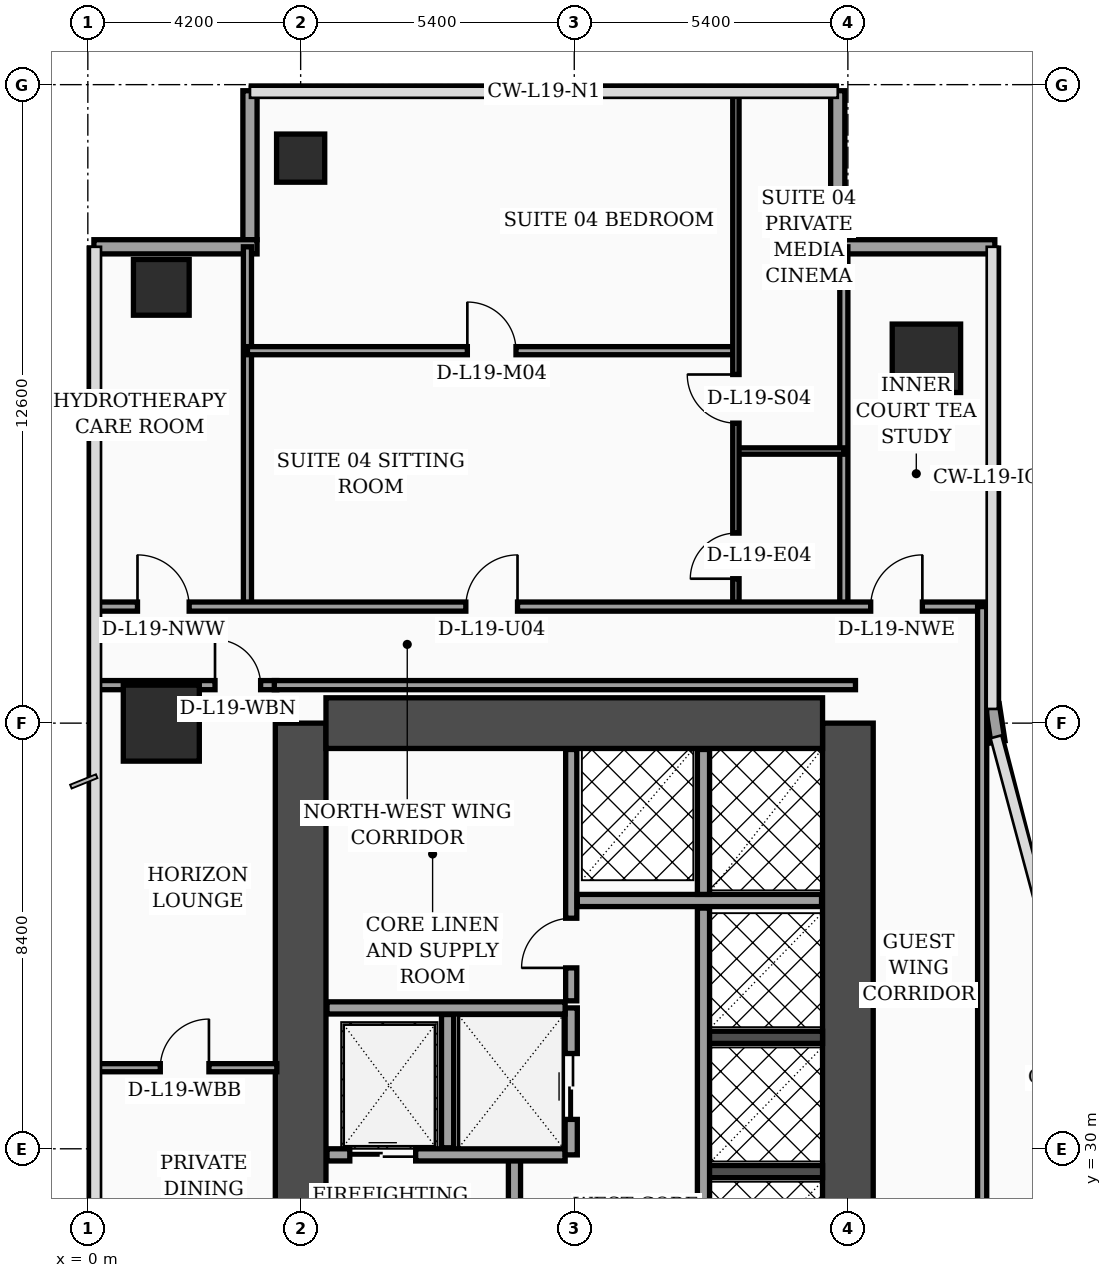
"""IFC4 building model, lengths in metres.
Left out: names, types, materials, properties, quantities, classifications, styles, units other than length and angle.
Written with IfcOpenShell. Run it as: python <this file> out.ifc"""

import sys

from ifc_helpers import new_model, si_unit, direction, frame, frame_2d, origin, origin_2d, place, context, subcontext, project, spatial, rectangle, hollow_rectangle, extrude, element, fill, save


model = new_model("IFC4")
c1 = context("Model", 3, precision=1e-05, world=origin(), true_north=direction((0.0, 1.0)))
c2 = subcontext(c1, "Body", "Model", "MODEL_VIEW")
j1 = project(units=[si_unit("LENGTHUNIT", "METRE"), si_unit("PLANEANGLEUNIT", "RADIAN")], contexts=[c1])
p1 = place(None, origin())
s1 = spatial("IfcSite", under=j1, at=p1, CompositionType="ELEMENT")
p2 = place(p1, origin())
s2 = spatial("IfcBuilding", under=s1, at=p2, CompositionType="ELEMENT")
p3 = place(p2, frame((0.0, 0.0, 81.2)))
s3 = spatial("IfcBuildingStorey", under=s2, at=p3, CompositionType="ELEMENT", Elevation=81.2)
p4 = place(p3, frame((4.2, 16.8, 0.0), z_axis=(0.0, 0.0, 1.0), x_axis=(0.0, 1.0, 0.0)))
e1 = element("IfcWall", 1, at=p4, inside=s3, PredefinedType="SHEAR", context=c2, shape_type="SweptSolid", body=[
    extrude(rectangle(XDim=21.6, YDim=1.0, at=frame_2d((10.8, 0.0))), origin(), (0.0, 0.0, 1.0), 3.56),
])
p5 = place(p3, frame((15.0, 16.8, 0.0), z_axis=(0.0, 0.0, 1.0), x_axis=(0.0, 1.0, 0.0)))
e2 = element("IfcWall", 2, at=p5, inside=s3, PredefinedType="SHEAR", context=c2, shape_type="SweptSolid", body=[
    extrude(rectangle(XDim=21.6, YDim=1.0, at=frame_2d((10.8, 0.0))), origin(), (0.0, 0.0, 1.0), 3.56),
])
p6 = place(p5, frame((8.65, 0.0, 0.0)))
e3 = element("IfcOpeningElement", 3, at=p6, cuts=e2, PredefinedType="OPENING", context=c2, shape_type="SweptSolid", body=[
    extrude(rectangle(XDim=1.1, YDim=2.2, at=frame_2d((0.55, 1.1))), frame((0.0, 0.51, 0.0), z_axis=(0.0, -1.0, 0.0), x_axis=(1.0, 0.0, 0.0)), (0.0, 0.0, 1.0), 1.02),
])
p7 = place(p5, frame((1.25, 0.0, 0.0)))
e4 = element("IfcOpeningElement", 4, at=p7, cuts=e2, PredefinedType="OPENING", context=c2, shape_type="SweptSolid", body=[
    extrude(rectangle(XDim=1.1, YDim=2.2, at=frame_2d((0.55, 1.1))), frame((0.0, 0.51, 0.0), z_axis=(0.0, -1.0, 0.0), x_axis=(1.0, 0.0, 0.0)), (0.0, 0.0, 1.0), 1.02),
])
p8 = place(p5, frame((3.8, 0.0, 0.0)))
e5 = element("IfcOpeningElement", 5, at=p8, cuts=e2, PredefinedType="OPENING", context=c2, shape_type="SweptSolid", body=[
    extrude(rectangle(XDim=1.1, YDim=2.2, at=frame_2d((0.55, 1.1))), frame((0.0, 0.51, 0.0), z_axis=(0.0, -1.0, 0.0), x_axis=(1.0, 0.0, 0.0)), (0.0, 0.0, 1.0), 1.02),
])
p9 = place(p5, frame((6.35, 0.0, 0.0)))
e6 = element("IfcOpeningElement", 6, at=p9, cuts=e2, PredefinedType="OPENING", context=c2, shape_type="SweptSolid", body=[
    extrude(rectangle(XDim=1.1, YDim=2.2, at=frame_2d((0.55, 1.1))), frame((0.0, 0.51, 0.0), z_axis=(0.0, -1.0, 0.0), x_axis=(1.0, 0.0, 0.0)), (0.0, 0.0, 1.0), 1.02),
])
p10 = place(p3, frame((4.7, 38.4, 0.0), z_axis=(0.0, 0.0, 1.0), x_axis=(1.0, 0.0, 0.0)))
e7 = element("IfcWall", 7, at=p10, inside=s3, PredefinedType="SHEAR", context=c2, shape_type="SweptSolid", body=[
    extrude(rectangle(XDim=9.8, YDim=1.0, at=frame_2d((4.9, 0.0))), origin(), (0.0, 0.0, 1.0), 3.56),
])
for number, where, z_axis, x_axis in (
    (8, (12.18, 29.55, 0.0), (0.0, 0.0, 1.0), (1.0, 0.0, 0.0)),
    (9, (12.18, 32.2, 0.0), (0.0, 0.0, 1.0), (1.0, 0.0, 0.0)),
):
    element("IfcWall", number, at=place(p3, frame(where, z_axis=z_axis, x_axis=x_axis)), inside=s3, PredefinedType="SOLIDWALL", context=c2, shape_type="SweptSolid", body=[
        extrude(rectangle(XDim=2.32, YDim=0.24, at=frame_2d((1.16, 0.0))), origin(), (0.0, 0.0, 1.0), 3.56),
    ])
p11 = place(p3, frame((1.45, 38.4, 0.0), z_axis=(0.0, 0.0, 1.0), x_axis=(1.0, 0.0, 0.0)))
e10 = element("IfcColumn", 10, at=p11, inside=s3, PredefinedType="COLUMN", context=c2, shape_type="SweptSolid", body=[
    extrude(rectangle(XDim=1.5, YDim=1.5, at=origin_2d()), origin(), (0.0, 0.0, 1.0), 3.56),
])
p12 = place(p3, frame((1.45, 47.0, 0.0), z_axis=(0.0, 0.0, 1.0), x_axis=(1.0, 0.0, 0.0)))
e11 = element("IfcColumn", 11, at=p12, inside=s3, PredefinedType="COLUMN", context=c2, shape_type="SweptSolid", body=[
    extrude(hollow_rectangle(XDim=1.1, YDim=1.1, WallThickness=0.045, at=origin_2d()), origin(), (0.0, 0.0, 1.0), 3.56),
])
p13 = place(p3, frame((4.2, 49.55, 0.0), z_axis=(0.0, 0.0, 1.0), x_axis=(1.0, 0.0, 0.0)))
e12 = element("IfcColumn", 12, at=p13, inside=s3, PredefinedType="COLUMN", context=c2, shape_type="SweptSolid", body=[
    extrude(hollow_rectangle(XDim=0.95, YDim=0.95, WallThickness=0.04, at=origin_2d()), origin(), (0.0, 0.0, 1.0), 3.56),
])
p14 = place(p3, frame((16.55, 45.6, 0.0), z_axis=(0.0, 0.0, 1.0), x_axis=(1.0, 0.0, 0.0)))
e13 = element("IfcColumn", 13, at=p14, inside=s3, PredefinedType="COLUMN", context=c2, shape_type="SweptSolid", body=[
    extrude(rectangle(XDim=1.35, YDim=1.35, at=origin_2d()), origin(), (0.0, 0.0, 1.0), 3.56),
])
p15 = place(p3, frame((17.962, 38.03, 0.0), z_axis=(0.0, 0.0, 1.0), x_axis=(-0.15141125477, 0.988470855377, 0.0)))
e14 = element("IfcWall", 14, at=p15, inside=s3, PredefinedType="SOLIDWALL", context=c2, shape_type="SweptSolid", body=[
    extrude(rectangle(XDim=0.739, YDim=0.28, at=frame_2d((0.369, 0.0))), origin(), (0.0, 0.0, 1.0), 3.56),
])
p16 = place(p3, frame((17.9, 47.8, 0.0), z_axis=(0.0, 0.0, 1.0), x_axis=(-1.0, 0.0, 0.0)))
e15 = element("IfcWall", 15, at=p16, inside=s3, PredefinedType="SOLIDWALL", context=c2, shape_type="SweptSolid", body=[
    extrude(rectangle(XDim=3.24, YDim=0.28, at=frame_2d((1.62, 0.0))), origin(), (0.0, 0.0, 1.0), 3.56),
])
p17 = place(p3, frame((14.8, 47.94, 0.0), z_axis=(0.0, 0.0, 1.0), x_axis=(0.0, 1.0, 0.0)))
e16 = element("IfcWall", 16, at=p17, inside=s3, PredefinedType="SOLIDWALL", context=c2, shape_type="SweptSolid", body=[
    extrude(rectangle(XDim=2.94, YDim=0.28, at=frame_2d((1.47, 0.0))), origin(), (0.0, 0.0, 1.0), 3.56),
])
p18 = place(p3, frame((3.2, 50.88, 0.0), z_axis=(0.0, 0.0, 1.0), x_axis=(0.0, -1.0, 0.0)))
e17 = element("IfcWall", 17, at=p18, inside=s3, PredefinedType="SOLIDWALL", context=c2, shape_type="SweptSolid", body=[
    extrude(rectangle(XDim=2.94, YDim=0.28, at=frame_2d((1.47, 0.0))), origin(), (0.0, 0.0, 1.0), 3.04),
])
p19 = place(p3, frame((3.34, 47.8, 0.0), z_axis=(0.0, 0.0, 1.0), x_axis=(-1.0, 0.0, 0.0)))
e18 = element("IfcWall", 18, at=p19, inside=s3, PredefinedType="SOLIDWALL", context=c2, shape_type="SweptSolid", body=[
    extrude(rectangle(XDim=3.22, YDim=0.28, at=frame_2d((1.61, 0.0))), origin(), (0.0, 0.0, 1.0), 3.04),
])
p20 = place(p3, frame((8.42, 26.82, 0.0), z_axis=(0.0, 0.0, 1.0), x_axis=(0.0, 1.0, 0.0)))
e19 = element("IfcWall", 19, at=p20, inside=s3, PredefinedType="SOLIDWALL", context=c2, shape_type="SweptSolid", body=[
    extrude(rectangle(XDim=3.0, YDim=0.24, at=frame_2d((1.5, 0.0))), origin(), (0.0, 0.0, 1.0), 3.56),
])
p21 = place(p20, frame((0.9, 0.0, 0.0)))
e20 = element("IfcOpeningElement", 20, at=p21, cuts=e19, PredefinedType="OPENING", context=c2, shape_type="SweptSolid", body=[
    extrude(rectangle(XDim=1.1, YDim=2.2, at=frame_2d((0.55, 1.1))), frame((0.0, 0.13, 0.0), z_axis=(0.0, -1.0, 0.0), x_axis=(1.0, 0.0, 0.0)), (0.0, 0.0, 1.0), 0.26),
])
p22 = place(p3, frame((4.72, 29.88, 0.0), z_axis=(0.0, 0.0, 1.0), x_axis=(1.0, 0.0, 0.0)))
e21 = element("IfcWall", 21, at=p22, inside=s3, PredefinedType="SOLIDWALL", context=c2, shape_type="SweptSolid", body=[
    extrude(rectangle(XDim=4.7, YDim=0.24, at=frame_2d((2.35, 0.0))), origin(), (0.0, 0.0, 1.0), 3.56),
])
p23 = place(p22, frame((0.45, 0.0, 0.0)))
e22 = element("IfcOpeningElement", 22, at=p23, cuts=e21, PredefinedType="OPENING", context=c2, shape_type="SweptSolid", body=[
    extrude(rectangle(XDim=1.3, YDim=2.35, at=frame_2d((0.65, 1.175))), frame((0.0, 0.13, 0.0), z_axis=(0.0, -1.0, 0.0), x_axis=(1.0, 0.0, 0.0)), (0.0, 0.0, 1.0), 0.26),
])
p24 = place(p3, frame((7.1, 30.02, 0.0), z_axis=(0.0, 0.0, 1.0), x_axis=(0.0, 1.0, 0.0)))
e23 = element("IfcWall", 23, at=p24, inside=s3, PredefinedType="SOLIDWALL", context=c2, shape_type="SweptSolid", body=[
    extrude(rectangle(XDim=2.63, YDim=0.24, at=frame_2d((1.315, 0.0))), origin(), (0.0, 0.0, 1.0), 3.56),
])
p25 = place(p3, frame((9.54, 29.88, 0.0), z_axis=(0.0, 0.0, 1.0), x_axis=(0.0, 1.0, 0.0)))
e24 = element("IfcWall", 24, at=p25, inside=s3, PredefinedType="SOLIDWALL", context=c2, shape_type="SweptSolid", body=[
    extrude(rectangle(XDim=2.9, YDim=0.24, at=frame_2d((1.45, 0.0))), origin(), (0.0, 0.0, 1.0), 3.56),
])
p26 = place(p25, frame((0.7, 0.0, 0.0)))
e25 = element("IfcOpeningElement", 25, at=p26, cuts=e24, PredefinedType="OPENING", context=c2, shape_type="SweptSolid", body=[
    extrude(rectangle(XDim=1.3, YDim=2.35, at=frame_2d((0.65, 1.175))), frame((0.0, 0.13, 0.0), z_axis=(0.0, -1.0, 0.0), x_axis=(1.0, 0.0, 0.0)), (0.0, 0.0, 1.0), 0.26),
])
p27 = place(p3, frame((4.72, 32.78, 0.0), z_axis=(0.0, 0.0, 1.0), x_axis=(1.0, 0.0, 0.0)))
e26 = element("IfcWall", 26, at=p27, inside=s3, PredefinedType="SOLIDWALL", context=c2, shape_type="SweptSolid", body=[
    extrude(rectangle(XDim=4.7, YDim=0.24, at=frame_2d((2.35, 0.0))), origin(), (0.0, 0.0, 1.0), 3.56),
])
p28 = place(p3, frame((9.54, 32.92, 0.0), z_axis=(0.0, 0.0, 1.0), x_axis=(0.0, 1.0, 0.0)))
e27 = element("IfcWall", 27, at=p28, inside=s3, PredefinedType="SOLIDWALL", context=c2, shape_type="SweptSolid", body=[
    extrude(rectangle(XDim=4.96, YDim=0.22, at=frame_2d((2.48, 0.0))), origin(), (0.0, 0.0, 1.0), 3.56),
])
p29 = place(p28, frame((0.65, 0.0, 0.0)))
e28 = element("IfcOpeningElement", 28, at=p29, cuts=e27, PredefinedType="OPENING", context=c2, shape_type="SweptSolid", body=[
    extrude(rectangle(XDim=0.98, YDim=2.15, at=frame_2d((0.49, 1.075))), frame((0.0, 0.12, 0.0), z_axis=(0.0, -1.0, 0.0), x_axis=(1.0, 0.0, 0.0)), (0.0, 0.0, 1.0), 0.24),
])
p30 = place(p3, frame((12.15, 27.0, 0.0), z_axis=(0.0, 0.0, 1.0), x_axis=(0.0, 1.0, 0.0)))
e29 = element("IfcWall", 29, at=p30, inside=s3, PredefinedType="SOLIDWALL", context=c2, shape_type="SweptSolid", body=[
    extrude(rectangle(XDim=7.75, YDim=0.24, at=frame_2d((3.875, 0.0))), origin(), (0.0, 0.0, 1.0), 3.56),
])
p31 = place(p3, frame((9.66, 34.9, 0.0), z_axis=(0.0, 0.0, 1.0), x_axis=(1.0, 0.0, 0.0)))
e30 = element("IfcWall", 30, at=p31, inside=s3, PredefinedType="SOLIDWALL", context=c2, shape_type="SweptSolid", body=[
    extrude(rectangle(XDim=4.82, YDim=0.24, at=frame_2d((2.41, 0.0))), origin(), (0.0, 0.0, 1.0), 3.56),
])
p32 = place(p3, frame((12.15, 35.02, 0.0), z_axis=(0.0, 0.0, 1.0), x_axis=(0.0, 1.0, 0.0)))
e31 = element("IfcWall", 31, at=p32, inside=s3, PredefinedType="SOLIDWALL", context=c2, shape_type="SweptSolid", body=[
    extrude(rectangle(XDim=2.86, YDim=0.24, at=frame_2d((1.43, 0.0))), origin(), (0.0, 0.0, 1.0), 3.56),
])
p33 = place(p3, frame((0.08, 31.6, 0.0), z_axis=(0.0, 0.0, 1.0), x_axis=(1.0, 0.0, 0.0)))
e32 = element("IfcWall", 32, at=p33, inside=s3, PredefinedType="PARTITIONING", context=c2, shape_type="SweptSolid", body=[
    extrude(rectangle(XDim=3.65, YDim=0.16, at=frame_2d((1.825, 0.0))), origin(), (0.0, 0.0, 1.0), 3.04),
])
p34 = place(p33, frame((1.35, 0.0, 0.0)))
e33 = element("IfcOpeningElement", 33, at=p34, cuts=e32, PredefinedType="OPENING", context=c2, shape_type="SweptSolid", body=[
    extrude(rectangle(XDim=0.96, YDim=2.2, at=frame_2d((0.48, 1.1))), frame((0.0, 0.09, 0.0), z_axis=(0.0, -1.0, 0.0), x_axis=(1.0, 0.0, 0.0)), (0.0, 0.0, 1.0), 0.18),
])
p35 = place(p3, frame((0.08, 39.15, 0.0), z_axis=(0.0, 0.0, 1.0), x_axis=(1.0, 0.0, 0.0)))
e34 = element("IfcWall", 34, at=p35, inside=s3, PredefinedType="PARTITIONING", context=c2, shape_type="SweptSolid", body=[
    extrude(rectangle(XDim=3.65, YDim=0.18, at=frame_2d((1.825, 0.0))), origin(), (0.0, 0.0, 1.0), 2.84),
])
p36 = place(p35, frame((2.43, 0.0, 0.0)))
e35 = element("IfcOpeningElement", 35, at=p36, cuts=e34, PredefinedType="OPENING", context=c2, shape_type="SweptSolid", body=[
    extrude(rectangle(XDim=0.9, YDim=2.15, at=frame_2d((0.45, 1.075))), frame((0.0, 0.1, 0.0), z_axis=(0.0, -1.0, 0.0), x_axis=(1.0, 0.0, 0.0)), (0.0, 0.0, 1.0), 0.2),
])
p37 = place(p3, frame((3.15, 40.7, 0.0), z_axis=(0.0, 0.0, 1.0), x_axis=(0.0, 1.0, 0.0)))
e36 = element("IfcWall", 36, at=p37, inside=s3, PredefinedType="PARTITIONING", context=c2, shape_type="SweptSolid", body=[
    extrude(rectangle(XDim=7.1, YDim=0.16, at=frame_2d((3.55, 0.0))), origin(), (0.0, 0.0, 1.0), 3.14),
])
p38 = place(p3, frame((14.92, 40.7, 0.0), z_axis=(0.0, 0.0, 1.0), x_axis=(0.0, 1.0, 0.0)))
e37 = element("IfcWall", 37, at=p38, inside=s3, PredefinedType="PARTITIONING", context=c2, shape_type="SweptSolid", body=[
    extrude(rectangle(XDim=7.1, YDim=0.16, at=frame_2d((3.55, 0.0))), origin(), (0.0, 0.0, 1.0), 3.04),
])
p39 = place(p3, frame((12.79, 43.77, 0.0), z_axis=(0.0, 0.0, 1.0), x_axis=(1.0, 0.0, 0.0)))
e38 = element("IfcWall", 38, at=p39, inside=s3, PredefinedType="PARTITIONING", context=c2, shape_type="SweptSolid", body=[
    extrude(rectangle(XDim=2.13, YDim=0.125, at=frame_2d((1.065, 0.0))), origin(), (0.0, 0.0, 1.0), 3.56),
])
p40 = place(p3, frame((3.15, 45.75, 0.0), z_axis=(0.0, 0.0, 1.0), x_axis=(1.0, 0.0, 0.0)))
e39 = element("IfcWall", 39, at=p40, inside=s3, PredefinedType="PARTITIONING", context=c2, shape_type="SweptSolid", body=[
    extrude(rectangle(XDim=9.64, YDim=0.16, at=frame_2d((4.82, 0.0))), origin(), (0.0, 0.0, 1.0), 2.84),
])
p41 = place(p40, frame((4.34, 0.0, 0.0)))
e40 = element("IfcOpeningElement", 40, at=p41, cuts=e39, PredefinedType="OPENING", context=c2, shape_type="SweptSolid", body=[
    extrude(rectangle(XDim=0.96, YDim=2.2, at=frame_2d((0.48, 1.1))), frame((0.0, 0.09, 0.0), z_axis=(0.0, -1.0, 0.0), x_axis=(1.0, 0.0, 0.0)), (0.0, 0.0, 1.0), 0.18),
])
p42 = place(p3, frame((12.79, 40.7, 0.0), z_axis=(0.0, 0.0, 1.0), x_axis=(0.0, 1.0, 0.0)))
e41 = element("IfcWall", 41, at=p42, inside=s3, PredefinedType="PARTITIONING", context=c2, shape_type="SweptSolid", body=[
    extrude(rectangle(XDim=10.24, YDim=0.125, at=frame_2d((5.12, 0.0))), origin(), (0.0, 0.0, 1.0), 3.04),
])
p43 = place(p42, frame((0.55, 0.0, 0.0)))
e42 = element("IfcOpeningElement", 42, at=p43, cuts=e41, PredefinedType="OPENING", context=c2, shape_type="SweptSolid", body=[
    extrude(rectangle(XDim=0.9, YDim=2.15, at=frame_2d((0.45, 1.075))), frame((0.0, 0.073, 0.0), z_axis=(0.0, -1.0, 0.0), x_axis=(1.0, 0.0, 0.0)), (0.0, 0.0, 1.0), 0.145),
])
p44 = place(p42, frame((3.62, 0.0, 0.0)))
e43 = element("IfcOpeningElement", 43, at=p44, cuts=e41, PredefinedType="OPENING", context=c2, shape_type="SweptSolid", body=[
    extrude(rectangle(XDim=0.96, YDim=2.2, at=frame_2d((0.48, 1.1))), frame((0.0, 0.073, 0.0), z_axis=(0.0, -1.0, 0.0), x_axis=(1.0, 0.0, 0.0)), (0.0, 0.0, 1.0), 0.145),
])
p45 = place(p3, frame((0.08, 40.7, 0.0), z_axis=(0.0, 0.0, 1.0), x_axis=(1.0, 0.0, 0.0)))
e44 = element("IfcWall", 44, at=p45, inside=s3, PredefinedType="PARTITIONING", context=c2, shape_type="SweptSolid", body=[
    extrude(rectangle(XDim=17.77, YDim=0.18, at=frame_2d((8.885, 0.0))), origin(), (0.0, 0.0, 1.0), 2.84),
])
p46 = place(p45, frame((0.9, 0.0, 0.0)))
e45 = element("IfcOpeningElement", 45, at=p46, cuts=e44, PredefinedType="OPENING", context=c2, shape_type="SweptSolid", body=[
    extrude(rectangle(XDim=1.02, YDim=2.2, at=frame_2d((0.51, 1.1))), frame((0.0, 0.1, 0.0), z_axis=(0.0, -1.0, 0.0), x_axis=(1.0, 0.0, 0.0)), (0.0, 0.0, 1.0), 0.2),
])
p47 = place(p45, frame((7.38, 0.0, 0.0)))
e46 = element("IfcOpeningElement", 46, at=p47, cuts=e44, PredefinedType="OPENING", context=c2, shape_type="SweptSolid", body=[
    extrude(rectangle(XDim=1.02, YDim=2.2, at=frame_2d((0.51, 1.1))), frame((0.0, 0.1, 0.0), z_axis=(0.0, -1.0, 0.0), x_axis=(1.0, 0.0, 0.0)), (0.0, 0.0, 1.0), 0.2),
])
p48 = place(p45, frame((15.37, 0.0, 0.0)))
e47 = element("IfcOpeningElement", 47, at=p48, cuts=e44, PredefinedType="OPENING", context=c2, shape_type="SweptSolid", body=[
    extrude(rectangle(XDim=1.02, YDim=2.2, at=frame_2d((0.51, 1.1))), frame((0.0, 0.1, 0.0), z_axis=(0.0, -1.0, 0.0), x_axis=(1.0, 0.0, 0.0)), (0.0, 0.0, 1.0), 0.2),
])
p49 = place(p3, frame((17.65, 24.3, 0.0), z_axis=(0.0, 0.0, 1.0), x_axis=(0.0, 1.0, 0.0)))
e48 = element("IfcWall", 48, at=p49, inside=s3, PredefinedType="PARTITIONING", context=c2, shape_type="SweptSolid", body=[
    extrude(rectangle(XDim=16.4, YDim=0.18, at=frame_2d((8.2, 0.0))), origin(), (0.0, 0.0, 1.0), 2.84),
])
p50 = place(p3, frame((3.68, 39.15, 0.0), z_axis=(0.0, 0.0, 1.0), x_axis=(1.0, 0.0, 0.0)))
e49 = element("IfcWall", 49, at=p50, inside=s3, PredefinedType="PARTITIONING", context=c2, shape_type="SweptSolid", body=[
    extrude(rectangle(XDim=11.47, YDim=0.18, at=frame_2d((5.735, 0.0))), origin(), (0.0, 0.0, 1.0), 2.84),
])
p51 = place(p23, origin())
e50 = element("IfcDoor", 50, at=p51, inside=s3, OperationType="DOUBLE_DOOR_SLIDING", PredefinedType="DOOR", context=c2, shape_type="SweptSolid", body=[
    extrude(rectangle(XDim=1.3, YDim=2.35, at=frame_2d((0.65, 1.175))), frame((0.0, 0.025, 0.0), z_axis=(0.0, -1.0, 0.0), x_axis=(1.0, 0.0, 0.0)), (0.0, 0.0, 1.0), 0.05),
])
fill(e22, e50)
p52 = place(p26, origin())
e51 = element("IfcDoor", 51, at=p52, inside=s3, OperationType="DOUBLE_DOOR_SLIDING", PredefinedType="DOOR", context=c2, shape_type="SweptSolid", body=[
    extrude(rectangle(XDim=1.3, YDim=2.35, at=frame_2d((0.65, 1.175))), frame((0.0, 0.025, 0.0), z_axis=(0.0, -1.0, 0.0), x_axis=(1.0, 0.0, 0.0)), (0.0, 0.0, 1.0), 0.05),
])
fill(e25, e51)
p53 = place(p29, origin())
e52 = element("IfcDoor", 52, at=p53, inside=s3, OperationType="SINGLE_SWING_LEFT", PredefinedType="DOOR", context=c2, shape_type="SweptSolid", body=[
    extrude(rectangle(XDim=0.98, YDim=2.15, at=frame_2d((0.49, 1.075))), frame((0.0, 0.025, 0.0), z_axis=(0.0, -1.0, 0.0), x_axis=(1.0, 0.0, 0.0)), (0.0, 0.0, 1.0), 0.05),
])
fill(e28, e52)
p54 = place(p34, origin())
e53 = element("IfcDoor", 53, at=p54, inside=s3, OperationType="SINGLE_SWING_RIGHT", PredefinedType="DOOR", context=c2, shape_type="SweptSolid", body=[
    extrude(rectangle(XDim=0.96, YDim=2.2, at=frame_2d((0.48, 1.1))), frame((0.0, 0.025, 0.0), z_axis=(0.0, -1.0, 0.0), x_axis=(1.0, 0.0, 0.0)), (0.0, 0.0, 1.0), 0.05),
])
fill(e33, e53)
p55 = place(p36, origin())
e54 = element("IfcDoor", 54, at=p55, inside=s3, OperationType="SINGLE_SWING_LEFT", PredefinedType="DOOR", context=c2, shape_type="SweptSolid", body=[
    extrude(rectangle(XDim=0.9, YDim=2.15, at=frame_2d((0.45, 1.075))), frame((0.0, 0.025, 0.0), z_axis=(0.0, -1.0, 0.0), x_axis=(1.0, 0.0, 0.0)), (0.0, 0.0, 1.0), 0.05),
])
fill(e35, e54)
p56 = place(p41, origin())
e55 = element("IfcDoor", 55, at=p56, inside=s3, OperationType="SINGLE_SWING_LEFT", PredefinedType="DOOR", context=c2, shape_type="SweptSolid", body=[
    extrude(rectangle(XDim=0.96, YDim=2.2, at=frame_2d((0.48, 1.1))), frame((0.0, 0.025, 0.0), z_axis=(0.0, -1.0, 0.0), x_axis=(1.0, 0.0, 0.0)), (0.0, 0.0, 1.0), 0.05),
])
fill(e40, e55)
p57 = place(p43, origin())
e56 = element("IfcDoor", 56, at=p57, inside=s3, OperationType="SINGLE_SWING_LEFT", PredefinedType="DOOR", context=c2, shape_type="SweptSolid", body=[
    extrude(rectangle(XDim=0.9, YDim=2.15, at=frame_2d((0.45, 1.075))), frame((0.0, 0.025, 0.0), z_axis=(0.0, -1.0, 0.0), x_axis=(1.0, 0.0, 0.0)), (0.0, 0.0, 1.0), 0.05),
])
fill(e42, e56)
p58 = place(p44, origin())
e57 = element("IfcDoor", 57, at=p58, inside=s3, OperationType="SINGLE_SWING_RIGHT", PredefinedType="DOOR", context=c2, shape_type="SweptSolid", body=[
    extrude(rectangle(XDim=0.96, YDim=2.2, at=frame_2d((0.48, 1.1))), frame((0.0, 0.025, 0.0), z_axis=(0.0, -1.0, 0.0), x_axis=(1.0, 0.0, 0.0)), (0.0, 0.0, 1.0), 0.05),
])
fill(e43, e57)
p59 = place(p46, origin())
e58 = element("IfcDoor", 58, at=p59, inside=s3, OperationType="SINGLE_SWING_LEFT", PredefinedType="DOOR", context=c2, shape_type="SweptSolid", body=[
    extrude(rectangle(XDim=1.02, YDim=2.2, at=frame_2d((0.51, 1.1))), frame((0.0, 0.025, 0.0), z_axis=(0.0, -1.0, 0.0), x_axis=(1.0, 0.0, 0.0)), (0.0, 0.0, 1.0), 0.05),
])
fill(e45, e58)
p60 = place(p47, origin())
e59 = element("IfcDoor", 59, at=p60, inside=s3, OperationType="SINGLE_SWING_RIGHT", PredefinedType="DOOR", context=c2, shape_type="SweptSolid", body=[
    extrude(rectangle(XDim=1.02, YDim=2.2, at=frame_2d((0.51, 1.1))), frame((0.0, 0.025, 0.0), z_axis=(0.0, -1.0, 0.0), x_axis=(1.0, 0.0, 0.0)), (0.0, 0.0, 1.0), 0.05),
])
fill(e46, e59)
p61 = place(p48, origin())
e60 = element("IfcDoor", 60, at=p61, inside=s3, OperationType="SINGLE_SWING_RIGHT", PredefinedType="DOOR", context=c2, shape_type="SweptSolid", body=[
    extrude(rectangle(XDim=1.02, YDim=2.2, at=frame_2d((0.51, 1.1))), frame((0.0, 0.025, 0.0), z_axis=(0.0, -1.0, 0.0), x_axis=(1.0, 0.0, 0.0)), (0.0, 0.0, 1.0), 0.05),
])
fill(e47, e60)
save(model, sys.argv[1])
